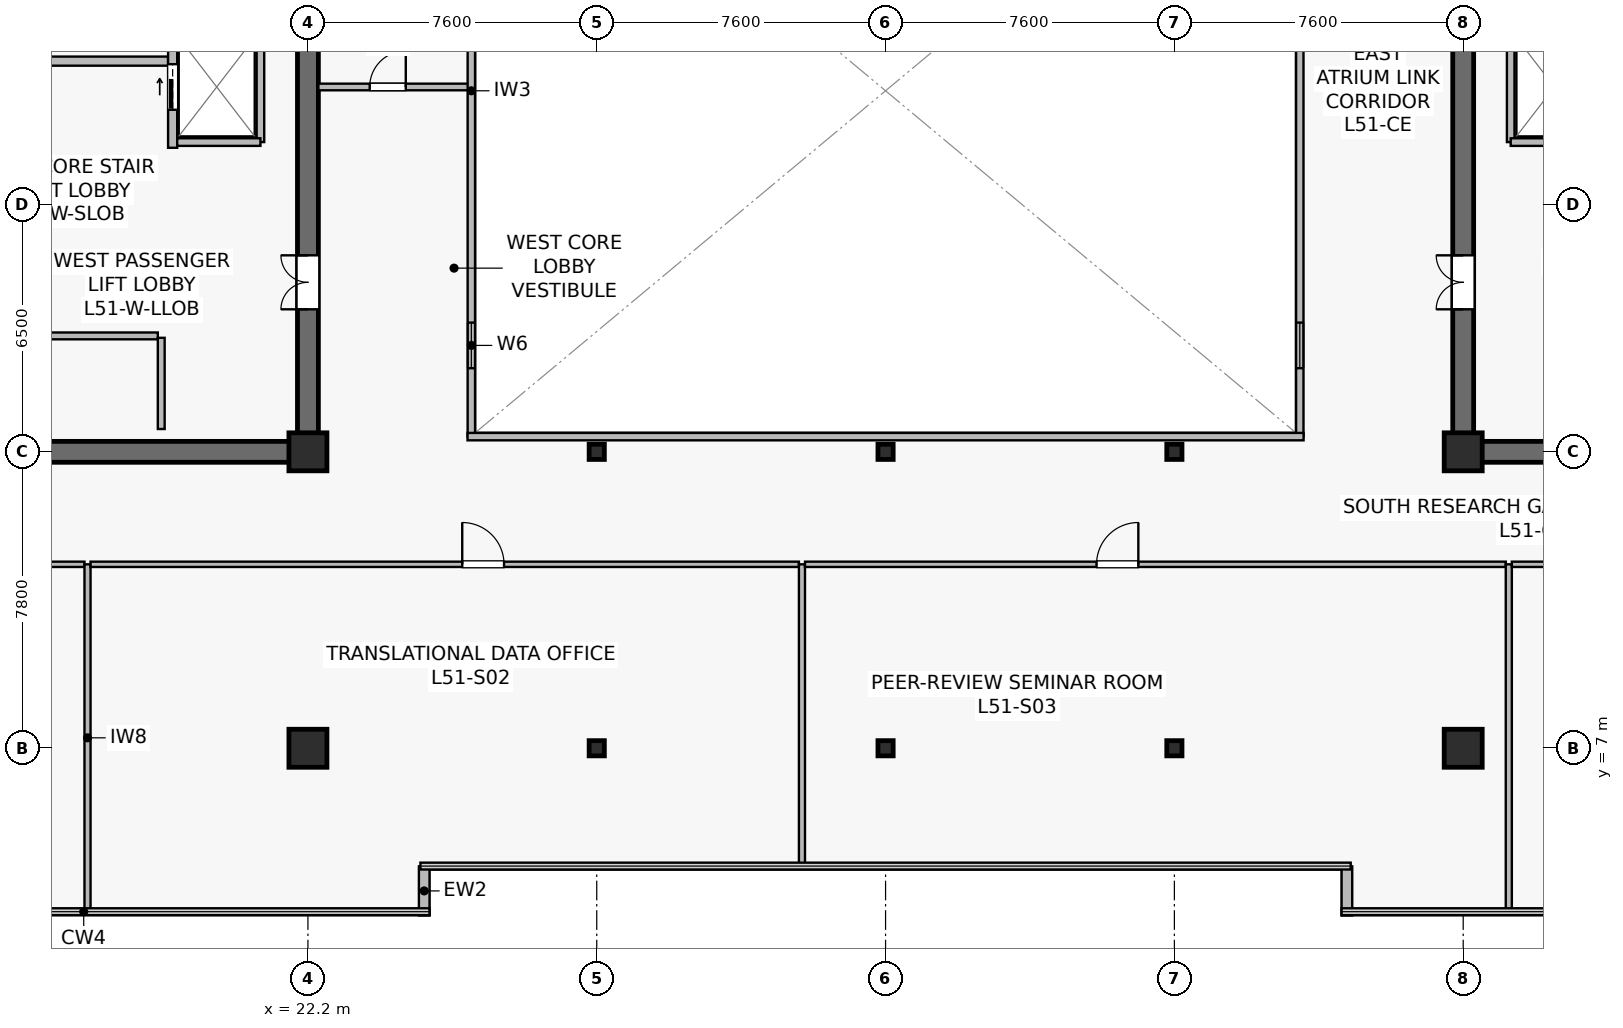
"""IFC4 building model, lengths in metres.
Left out: names, types, materials, properties, quantities, classifications, styles, units other than length and angle.
Written with IfcOpenShell. Run it as: python <this file> out.ifc"""

import sys

from ifc_helpers import new_model, si_unit, direction, frame, frame_2d, origin, origin_2d, place, context, subcontext, project, spatial, rectangle, hollow_rectangle, extrude, source, transform, mapped, element, fill, save


model = new_model("IFC4")
c1 = context("Model", 3, precision=1e-05, world=origin(), true_north=direction((0.0, 1.0)))
c2 = subcontext(c1, "Body", "Model", "MODEL_VIEW")
j1 = project(units=[si_unit("LENGTHUNIT", "METRE"), si_unit("PLANEANGLEUNIT", "RADIAN")], contexts=[c1])
p1 = place(None, origin())
s1 = spatial("IfcSite", under=j1, at=p1, CompositionType="ELEMENT")
p2 = place(p1, origin())
s2 = spatial("IfcBuilding", under=s1, at=p2, CompositionType="ELEMENT")
p3 = place(p2, frame((0.0, 0.0, 213.7)))
s3 = spatial("IfcBuildingStorey", under=s2, at=p3, CompositionType="ELEMENT", Elevation=213.7)
p4 = place(p3, frame((7.125, 14.8, 0.0), z_axis=(0.0, 0.0, 1.0), x_axis=(1.0, 0.0, 0.0)))
e1 = element("IfcWall", 1, at=p4, inside=s3, PredefinedType="SHEAR", context=c2, shape_type="SweptSolid", body=[
    extrude(rectangle(XDim=15.35, YDim=0.55, at=frame_2d((7.675, 0.0))), origin(), (0.0, 0.0, 1.0), 3.8),
])
p5 = place(p3, frame((22.2, 15.075, 0.0), z_axis=(0.0, 0.0, 1.0), x_axis=(0.0, 1.0, 0.0)))
e2 = element("IfcWall", 2, at=p5, inside=s3, PredefinedType="SHEAR", context=c2, shape_type="SweptSolid", body=[
    extrude(rectangle(XDim=18.45, YDim=0.55, at=frame_2d((9.225, 0.0))), origin(), (0.0, 0.0, 1.0), 3.8),
])
p6 = place(p5, frame((3.475, 0.0, 0.0)))
e3 = element("IfcOpeningElement", 3, at=p6, cuts=e2, PredefinedType="OPENING", context=c2, shape_type="SweptSolid", body=[
    extrude(rectangle(XDim=1.42, YDim=2.2, at=frame_2d((0.71, 1.1))), frame((0.0, 0.285, 0.0), z_axis=(0.0, -1.0, 0.0), x_axis=(1.0, 0.0, 0.0)), (0.0, 0.0, 1.0), 0.57),
])
p7 = place(p3, frame((52.325, 14.8, 0.0), z_axis=(0.0, 0.0, 1.0), x_axis=(1.0, 0.0, 0.0)))
e4 = element("IfcWall", 4, at=p7, inside=s3, PredefinedType="SHEAR", context=c2, shape_type="SweptSolid", body=[
    extrude(rectangle(XDim=15.35, YDim=0.55, at=frame_2d((7.675, 0.0))), origin(), (0.0, 0.0, 1.0), 3.8),
])
p8 = place(p3, frame((52.6, 15.075, 0.0), z_axis=(0.0, 0.0, 1.0), x_axis=(0.0, 1.0, 0.0)))
e5 = element("IfcWall", 5, at=p8, inside=s3, PredefinedType="SHEAR", context=c2, shape_type="SweptSolid", body=[
    extrude(rectangle(XDim=18.45, YDim=0.55, at=frame_2d((9.225, 0.0))), origin(), (0.0, 0.0, 1.0), 3.8),
])
p9 = place(p8, frame((3.475, 0.0, 0.0)))
e6 = element("IfcOpeningElement", 6, at=p9, cuts=e5, PredefinedType="OPENING", context=c2, shape_type="SweptSolid", body=[
    extrude(rectangle(XDim=1.42, YDim=2.2, at=frame_2d((0.71, 1.1))), frame((0.0, 0.285, 0.0), z_axis=(0.0, -1.0, 0.0), x_axis=(1.0, 0.0, 0.0)), (0.0, 0.0, 1.0), 0.57),
])
m1 = source(origin(), c2, "Body", "SweptSolid", [
    extrude(rectangle(XDim=1.0, YDim=1.0, at=origin_2d()), origin(), (0.0, 0.0, 1.0), 4.1),
])
for number, where, z_axis, x_axis in (
    (7, (22.2, 7.0, 0.0), (0.0, 0.0, 1.0), (1.0, 0.0, 0.0)),
    (8, (22.2, 14.8, 0.0), (0.0, 0.0, 1.0), (1.0, 0.0, 0.0)),
    (9, (52.6, 7.0, 0.0), (0.0, 0.0, 1.0), (1.0, 0.0, 0.0)),
    (10, (52.6, 14.8, 0.0), (0.0, 0.0, 1.0), (1.0, 0.0, 0.0)),
):
    element("IfcColumn", number, at=place(p3, frame(where, z_axis=z_axis, x_axis=x_axis)), inside=s3, PredefinedType="COLUMN", context=c2, shape_type="MappedRepresentation", body=[
        mapped(m1, transform((0.0, 0.0, 0.0), scale=1.0)),
    ])
m2 = source(origin(), c2, "Body", "SweptSolid", [
    extrude(hollow_rectangle(XDim=0.4, YDim=0.4, WallThickness=0.019, at=origin_2d()), origin(), (0.0, 0.0, 1.0), 4.1),
])
for number, where, z_axis, x_axis in (
    (11, (29.8, 7.0, 0.0), (0.0, 0.0, 1.0), (1.0, 0.0, 0.0)),
    (12, (29.8, 14.8, 0.0), (0.0, 0.0, 1.0), (1.0, 0.0, 0.0)),
    (13, (37.4, 7.0, 0.0), (0.0, 0.0, 1.0), (1.0, 0.0, 0.0)),
    (14, (37.4, 14.8, 0.0), (0.0, 0.0, 1.0), (1.0, 0.0, 0.0)),
    (15, (45.0, 7.0, 0.0), (0.0, 0.0, 1.0), (1.0, 0.0, 0.0)),
    (16, (45.0, 14.8, 0.0), (0.0, 0.0, 1.0), (1.0, 0.0, 0.0)),
):
    element("IfcColumn", number, at=place(p3, frame(where, z_axis=z_axis, x_axis=x_axis)), inside=s3, PredefinedType="COLUMN", context=c2, shape_type="MappedRepresentation", body=[
        mapped(m2, transform((0.0, 0.0, 0.0), scale=1.0)),
    ])
for number, where, z_axis, x_axis in (
    (17, (25.26, 2.6, 0.0), (0.0, 0.0, 1.0), (0.0, 1.0, 0.0)),
    (18, (49.54, 3.893, 0.0), (0.0, 0.0, 1.0), (0.0, -1.0, 0.0)),
):
    element("IfcWall", number, at=place(p3, frame(where, z_axis=z_axis, x_axis=x_axis)), inside=s3, PredefinedType="STANDARD", context=c2, shape_type="SweptSolid", body=[
        extrude(rectangle(XDim=1.293, YDim=0.28, at=frame_2d((0.646, 0.0))), origin(), (0.0, 0.0, 1.0), 3.8),
    ])
p10 = place(p3, frame((11.6, 25.08, 0.0), z_axis=(0.0, 0.0, 1.0), x_axis=(1.0, 0.0, 0.0)))
e19 = element("IfcWall", 19, at=p10, inside=s3, PredefinedType="SOLIDWALL", context=c2, shape_type="SweptSolid", body=[
    extrude(rectangle(XDim=6.92, YDim=0.24, at=frame_2d((3.46, 0.0))), origin(), (0.0, 0.0, 1.0), 3.197),
])
p11 = place(p10, frame((2.6, 0.0, 0.0)))
e20 = element("IfcOpeningElement", 20, at=p11, cuts=e19, PredefinedType="OPENING", context=c2, shape_type="SweptSolid", body=[
    extrude(rectangle(XDim=1.2, YDim=2.16, at=frame_2d((0.6, 1.08))), frame((0.0, 0.13, 0.0), z_axis=(0.0, -1.0, 0.0), x_axis=(1.0, 0.0, 0.0)), (0.0, 0.0, 1.0), 0.26),
])
p12 = place(p3, frame((18.64, 22.8, 0.0), z_axis=(0.0, 0.0, 1.0), x_axis=(0.0, 1.0, 0.0)))
e21 = element("IfcWall", 21, at=p12, inside=s3, PredefinedType="SOLIDWALL", context=c2, shape_type="SweptSolid", body=[
    extrude(rectangle(XDim=6.85, YDim=0.24, at=frame_2d((3.425, 0.0))), origin(), (0.0, 0.0, 1.0), 2.935),
])
p13 = place(p12, frame((4.85, 0.0, 0.0)))
e22 = element("IfcOpeningElement", 22, at=p13, cuts=e21, PredefinedType="OPENING", context=c2, shape_type="SweptSolid", body=[
    extrude(rectangle(XDim=1.1, YDim=2.22, at=frame_2d((0.55, 1.11))), frame((0.0, 0.13, 0.0), z_axis=(0.0, -1.0, 0.0), x_axis=(1.0, 0.0, 0.0)), (0.0, 0.0, 1.0), 0.26),
])
p14 = place(p12, frame((1.0, 0.0, 0.0)))
e23 = element("IfcOpeningElement", 23, at=p14, cuts=e21, PredefinedType="OPENING", context=c2, shape_type="SweptSolid", body=[
    extrude(rectangle(XDim=1.2, YDim=2.22, at=frame_2d((0.6, 1.11))), frame((0.0, 0.13, 0.0), z_axis=(0.0, -1.0, 0.0), x_axis=(1.0, 0.0, 0.0)), (0.0, 0.0, 1.0), 0.26),
])
p15 = place(p3, frame((20.95, 22.95, 0.0), z_axis=(0.0, 0.0, 1.0), x_axis=(0.0, 1.0, 0.0)))
e24 = element("IfcWall", 24, at=p15, inside=s3, PredefinedType="SOLIDWALL", context=c2, shape_type="SweptSolid", body=[
    extrude(rectangle(XDim=2.9, YDim=0.2, at=frame_2d((1.45, 0.0))), origin(), (0.0, 0.0, 1.0), 2.935),
])
p16 = place(p3, frame((18.76, 22.95, 0.0), z_axis=(0.0, 0.0, 1.0), x_axis=(1.0, 0.0, 0.0)))
e25 = element("IfcWall", 25, at=p16, inside=s3, PredefinedType="SOLIDWALL", context=c2, shape_type="SweptSolid", body=[
    extrude(rectangle(XDim=2.19, YDim=0.2, at=frame_2d((1.095, 0.0))), origin(), (0.0, 0.0, 1.0), 3.8),
])
p17 = place(p3, frame((8.85, 17.85, 0.0), z_axis=(0.0, 0.0, 1.0), x_axis=(1.0, 0.0, 0.0)))
e26 = element("IfcWall", 26, at=p17, inside=s3, PredefinedType="SOLIDWALL", context=c2, shape_type="SweptSolid", body=[
    extrude(rectangle(XDim=9.4, YDim=0.18, at=frame_2d((4.7, 0.0))), origin(), (0.0, 0.0, 1.0), 3.197),
])
p18 = place(p17, frame((4.225, 0.0, 0.0)))
e27 = element("IfcOpeningElement", 27, at=p18, cuts=e26, PredefinedType="OPENING", context=c2, shape_type="SweptSolid", body=[
    extrude(rectangle(XDim=0.95, YDim=2.15, at=frame_2d((0.475, 1.075))), frame((0.0, 0.1, 0.0), z_axis=(0.0, -1.0, 0.0), x_axis=(1.0, 0.0, 0.0)), (0.0, 0.0, 1.0), 0.2),
])
p19 = place(p3, frame((18.34, 15.4, 0.0), z_axis=(0.0, 0.0, 1.0), x_axis=(0.0, 1.0, 0.0)))
e28 = element("IfcWall", 28, at=p19, inside=s3, PredefinedType="SOLIDWALL", context=c2, shape_type="SweptSolid", body=[
    extrude(rectangle(XDim=2.4, YDim=0.18, at=frame_2d((1.2, 0.0))), origin(), (0.0, 0.0, 1.0), 3.8),
])
p20 = place(p3, frame((53.85, 22.95, 0.0), z_axis=(0.0, 0.0, 1.0), x_axis=(0.0, 1.0, 0.0)))
e29 = element("IfcWall", 29, at=p20, inside=s3, PredefinedType="SOLIDWALL", context=c2, shape_type="SweptSolid", body=[
    extrude(rectangle(XDim=2.9, YDim=0.2, at=frame_2d((1.45, 0.0))), origin(), (0.0, 0.0, 1.0), 2.935),
])
p21 = place(p3, frame((53.85, 22.95, 0.0), z_axis=(0.0, 0.0, 1.0), x_axis=(1.0, 0.0, 0.0)))
e30 = element("IfcWall", 30, at=p21, inside=s3, PredefinedType="SOLIDWALL", context=c2, shape_type="SweptSolid", body=[
    extrude(rectangle(XDim=2.19, YDim=0.2, at=frame_2d((1.095, 0.0))), origin(), (0.0, 0.0, 1.0), 3.8),
])
p22 = place(p3, frame((22.475, 24.4, 0.0), z_axis=(0.0, 0.0, 1.0), x_axis=(1.0, 0.0, 0.0)))
e31 = element("IfcWall", 31, at=p22, inside=s3, PredefinedType="PARTITIONING", context=c2, shape_type="SweptSolid", body=[
    extrude(rectangle(XDim=4.025, YDim=0.175, at=frame_2d((2.012, 0.0))), origin(), (0.0, 0.0, 1.0), 3.8),
])
p23 = place(p22, frame((1.35, 0.0, 0.0)))
e32 = element("IfcOpeningElement", 32, at=p23, cuts=e31, PredefinedType="OPENING", context=c2, shape_type="SweptSolid", body=[
    extrude(rectangle(XDim=0.95, YDim=2.15, at=frame_2d((0.475, 1.075))), frame((0.0, 0.098, 0.0), z_axis=(0.0, -1.0, 0.0), x_axis=(1.0, 0.0, 0.0)), (0.0, 0.0, 1.0), 0.195),
])
p24 = place(p3, frame((26.5, 15.2, 0.0), z_axis=(0.0, 0.0, 1.0), x_axis=(0.0, 1.0, 0.0)))
e33 = element("IfcWall", 33, at=p24, inside=s3, PredefinedType="SOLIDWALL", context=c2, shape_type="SweptSolid", body=[
    extrude(rectangle(XDim=18.2, YDim=0.195, at=frame_2d((9.1, 0.0))), origin(), (0.0, 0.0, 1.0), 3.8),
])
p25 = place(p24, frame((1.8, 0.0, 0.9)))
e34 = element("IfcOpeningElement", 34, at=p25, cuts=e33, PredefinedType="OPENING", context=c2, shape_type="SweptSolid", body=[
    extrude(rectangle(XDim=1.2, YDim=1.35, at=frame_2d((0.6, 0.675))), frame((0.0, 0.107, 0.0), z_axis=(0.0, -1.0, 0.0), x_axis=(1.0, 0.0, 0.0)), (0.0, 0.0, 1.0), 0.215),
])
p26 = place(p24, frame((13.2, 0.0, 0.9)))
e35 = element("IfcOpeningElement", 35, at=p26, cuts=e33, PredefinedType="OPENING", context=c2, shape_type="SweptSolid", body=[
    extrude(rectangle(XDim=1.2, YDim=1.35, at=frame_2d((0.6, 0.675))), frame((0.0, 0.107, 0.0), z_axis=(0.0, -1.0, 0.0), x_axis=(1.0, 0.0, 0.0)), (0.0, 0.0, 1.0), 0.215),
])
p27 = place(p3, frame((48.3, 15.2, 0.0), z_axis=(0.0, 0.0, 1.0), x_axis=(0.0, 1.0, 0.0)))
e36 = element("IfcWall", 36, at=p27, inside=s3, PredefinedType="SOLIDWALL", context=c2, shape_type="SweptSolid", body=[
    extrude(rectangle(XDim=18.2, YDim=0.195, at=frame_2d((9.1, 0.0))), origin(), (0.0, 0.0, 1.0), 3.8),
])
p28 = place(p27, frame((1.8, 0.0, 0.9)))
e37 = element("IfcOpeningElement", 37, at=p28, cuts=e36, PredefinedType="OPENING", context=c2, shape_type="SweptSolid", body=[
    extrude(rectangle(XDim=1.2, YDim=1.35, at=frame_2d((0.6, 0.675))), frame((0.0, 0.107, 0.0), z_axis=(0.0, -1.0, 0.0), x_axis=(1.0, 0.0, 0.0)), (0.0, 0.0, 1.0), 0.215),
])
p29 = place(p27, frame((13.2, 0.0, 0.9)))
e38 = element("IfcOpeningElement", 38, at=p29, cuts=e36, PredefinedType="OPENING", context=c2, shape_type="SweptSolid", body=[
    extrude(rectangle(XDim=1.2, YDim=1.35, at=frame_2d((0.6, 0.675))), frame((0.0, 0.107, 0.0), z_axis=(0.0, -1.0, 0.0), x_axis=(1.0, 0.0, 0.0)), (0.0, 0.0, 1.0), 0.215),
])
p30 = place(p3, frame((26.4, 15.2, 0.0), z_axis=(0.0, 0.0, 1.0), x_axis=(1.0, 0.0, 0.0)))
e39 = element("IfcWall", 39, at=p30, inside=s3, PredefinedType="SOLIDWALL", context=c2, shape_type="SweptSolid", body=[
    extrude(rectangle(XDim=22.0, YDim=0.195, at=frame_2d((11.0, 0.0))), origin(), (0.0, 0.0, 1.0), 3.8),
])
p31 = place(p3, frame((7.31, 11.84, 0.0), z_axis=(0.0, 0.0, 1.0), x_axis=(1.0, 0.0, 0.0)))
e40 = element("IfcWall", 40, at=p31, inside=s3, PredefinedType="PARTITIONING", context=c2, shape_type="SweptSolid", body=[
    extrude(rectangle(XDim=9.01, YDim=0.14, at=frame_2d((4.505, 0.0))), origin(), (0.0, 0.0, 1.0), 3.197),
])
p32 = place(p31, frame((3.522, 0.0, 0.0)))
e41 = element("IfcOpeningElement", 41, at=p32, cuts=e40, PredefinedType="OPENING", context=c2, shape_type="SweptSolid", body=[
    extrude(rectangle(XDim=1.1, YDim=2.18, at=frame_2d((0.55, 1.09))), frame((0.0, 0.08, 0.0), z_axis=(0.0, -1.0, 0.0), x_axis=(1.0, 0.0, 0.0)), (0.0, 0.0, 1.0), 0.16),
])
p33 = place(p3, frame((16.4, 2.71, 0.0), z_axis=(0.0, 0.0, 1.0), x_axis=(0.0, 1.0, 0.0)))
e42 = element("IfcWall", 42, at=p33, inside=s3, PredefinedType="PARTITIONING", context=c2, shape_type="SweptSolid", body=[
    extrude(rectangle(XDim=9.13, YDim=0.16, at=frame_2d((4.565, 0.0))), origin(), (0.0, 0.0, 1.0), 3.135),
])
p34 = place(p3, frame((16.48, 11.84, 0.0), z_axis=(0.0, 0.0, 1.0), x_axis=(1.0, 0.0, 0.0)))
e43 = element("IfcWall", 43, at=p34, inside=s3, PredefinedType="PARTITIONING", context=c2, shape_type="SweptSolid", body=[
    extrude(rectangle(XDim=18.64, YDim=0.14, at=frame_2d((9.32, 0.0))), origin(), (0.0, 0.0, 1.0), 3.197),
])
p35 = place(p34, frame((9.781, 0.0, 0.0)))
e44 = element("IfcOpeningElement", 44, at=p35, cuts=e43, PredefinedType="OPENING", context=c2, shape_type="SweptSolid", body=[
    extrude(rectangle(XDim=1.1, YDim=2.18, at=frame_2d((0.55, 1.09))), frame((0.0, 0.08, 0.0), z_axis=(0.0, -1.0, 0.0), x_axis=(1.0, 0.0, 0.0)), (0.0, 0.0, 1.0), 0.16),
])
p36 = place(p3, frame((35.2, 3.91, 0.0), z_axis=(0.0, 0.0, 1.0), x_axis=(0.0, 1.0, 0.0)))
e45 = element("IfcWall", 45, at=p36, inside=s3, PredefinedType="PARTITIONING", context=c2, shape_type="SweptSolid", body=[
    extrude(rectangle(XDim=7.93, YDim=0.16, at=frame_2d((3.965, 0.0))), origin(), (0.0, 0.0, 1.0), 3.135),
])
p37 = place(p3, frame((35.28, 11.84, 0.0), z_axis=(0.0, 0.0, 1.0), x_axis=(1.0, 0.0, 0.0)))
e46 = element("IfcWall", 46, at=p37, inside=s3, PredefinedType="PARTITIONING", context=c2, shape_type="SweptSolid", body=[
    extrude(rectangle(XDim=18.44, YDim=0.14, at=frame_2d((9.22, 0.0))), origin(), (0.0, 0.0, 1.0), 3.197),
])
p38 = place(p37, frame((7.672, 0.0, 0.0)))
e47 = element("IfcOpeningElement", 47, at=p38, cuts=e46, PredefinedType="OPENING", context=c2, shape_type="SweptSolid", body=[
    extrude(rectangle(XDim=1.1, YDim=2.18, at=frame_2d((0.55, 1.09))), frame((0.0, 0.08, 0.0), z_axis=(0.0, -1.0, 0.0), x_axis=(1.0, 0.0, 0.0)), (0.0, 0.0, 1.0), 0.16),
])
p39 = place(p3, frame((53.8, 2.71, 0.0), z_axis=(0.0, 0.0, 1.0), x_axis=(0.0, 1.0, 0.0)))
e48 = element("IfcWall", 48, at=p39, inside=s3, PredefinedType="PARTITIONING", context=c2, shape_type="SweptSolid", body=[
    extrude(rectangle(XDim=9.13, YDim=0.16, at=frame_2d((4.565, 0.0))), origin(), (0.0, 0.0, 1.0), 3.135),
])
p40 = place(p3, frame((53.88, 11.84, 0.0), z_axis=(0.0, 0.0, 1.0), x_axis=(1.0, 0.0, 0.0)))
e49 = element("IfcWall", 49, at=p40, inside=s3, PredefinedType="PARTITIONING", context=c2, shape_type="SweptSolid", body=[
    extrude(rectangle(XDim=13.61, YDim=0.14, at=frame_2d((6.805, 0.0))), origin(), (0.0, 0.0, 1.0), 3.197),
])
p41 = place(p40, frame((6.964, 0.0, 0.0)))
e50 = element("IfcOpeningElement", 50, at=p41, cuts=e49, PredefinedType="OPENING", context=c2, shape_type="SweptSolid", body=[
    extrude(rectangle(XDim=1.1, YDim=2.18, at=frame_2d((0.55, 1.09))), frame((0.0, 0.08, 0.0), z_axis=(0.0, -1.0, 0.0), x_axis=(1.0, 0.0, 0.0)), (0.0, 0.0, 1.0), 0.16),
])
m3 = source(origin(), c2, "Body", "SweptSolid", [
    extrude(rectangle(XDim=1.2, YDim=1.35, at=frame_2d((0.6, 0.675))), frame((0.0, 0.03, 0.0), z_axis=(0.0, -1.0, 0.0), x_axis=(1.0, 0.0, 0.0)), (0.0, 0.0, 1.0), 0.06),
])
p42 = place(p25, origin())
e51 = element("IfcWindow", 51, at=p42, inside=s3, PartitioningType="SINGLE_PANEL", PredefinedType="WINDOW", context=c2, shape_type="MappedRepresentation", body=[
    mapped(m3, transform((0.0, 0.0, 0.0), scale=1.0)),
])
fill(e34, e51)
p43 = place(p28, origin())
e52 = element("IfcWindow", 52, at=p43, inside=s3, PartitioningType="SINGLE_PANEL", PredefinedType="WINDOW", context=c2, shape_type="MappedRepresentation", body=[
    mapped(m3, transform((0.0, 0.0, 0.0), scale=1.0)),
])
fill(e37, e52)
m4 = source(origin(), c2, "Body", "SweptSolid", [
    extrude(rectangle(XDim=1.2, YDim=2.22, at=frame_2d((0.6, 1.11))), frame((0.0, 0.025, 0.0), z_axis=(0.0, -1.0, 0.0), x_axis=(1.0, 0.0, 0.0)), (0.0, 0.0, 1.0), 0.05),
])
p44 = place(p14, origin())
e53 = element("IfcDoor", 53, at=p44, inside=s3, OperationType="SLIDING_TO_RIGHT", PredefinedType="USERDEFINED", context=c2, shape_type="MappedRepresentation", body=[
    mapped(m4, transform((0.0, 0.0, 0.0), scale=1.0)),
])
fill(e23, e53)
m5 = source(origin(), c2, "Body", "SweptSolid", [
    extrude(rectangle(XDim=1.42, YDim=2.2, at=frame_2d((0.71, 1.1))), frame((0.0, 0.025, 0.0), z_axis=(0.0, -1.0, 0.0), x_axis=(1.0, 0.0, 0.0)), (0.0, 0.0, 1.0), 0.05),
])
p45 = place(p6, origin())
e54 = element("IfcDoor", 54, at=p45, inside=s3, OperationType="DOUBLE_DOOR_SINGLE_SWING", PredefinedType="DOOR", context=c2, shape_type="MappedRepresentation", body=[
    mapped(m5, transform((0.0, 0.0, 0.0), scale=1.0)),
])
fill(e3, e54)
p46 = place(p9, origin())
e55 = element("IfcDoor", 55, at=p46, inside=s3, OperationType="DOUBLE_DOOR_SINGLE_SWING", PredefinedType="DOOR", context=c2, shape_type="MappedRepresentation", body=[
    mapped(m5, transform((0.0, 0.0, 0.0), scale=1.0)),
])
fill(e6, e55)
m6 = source(origin(), c2, "Body", "SweptSolid", [
    extrude(rectangle(XDim=0.95, YDim=2.15, at=frame_2d((0.475, 1.075))), frame((0.0, 0.025, 0.0), z_axis=(0.0, -1.0, 0.0), x_axis=(1.0, 0.0, 0.0)), (0.0, 0.0, 1.0), 0.05),
])
p47 = place(p23, origin())
e56 = element("IfcDoor", 56, at=p47, inside=s3, OperationType="SINGLE_SWING_RIGHT", PredefinedType="DOOR", context=c2, shape_type="MappedRepresentation", body=[
    mapped(m6, transform((0.0, 0.0, 0.0), scale=1.0)),
])
fill(e32, e56)
m7 = source(origin(), c2, "Body", "SweptSolid", [
    extrude(rectangle(XDim=1.1, YDim=2.18, at=frame_2d((0.55, 1.09))), frame((0.0, 0.025, 0.0), z_axis=(0.0, -1.0, 0.0), x_axis=(1.0, 0.0, 0.0)), (0.0, 0.0, 1.0), 0.05),
])
p48 = place(p35, origin())
e57 = element("IfcDoor", 57, at=p48, inside=s3, OperationType="SINGLE_SWING_LEFT", PredefinedType="DOOR", context=c2, shape_type="MappedRepresentation", body=[
    mapped(m7, transform((0.0, 0.0, 0.0), scale=1.0)),
])
fill(e44, e57)
p49 = place(p38, origin())
e58 = element("IfcDoor", 58, at=p49, inside=s3, OperationType="SINGLE_SWING_RIGHT", PredefinedType="DOOR", context=c2, shape_type="MappedRepresentation", body=[
    mapped(m7, transform((0.0, 0.0, 0.0), scale=1.0)),
])
fill(e47, e58)
save(model, sys.argv[1])
